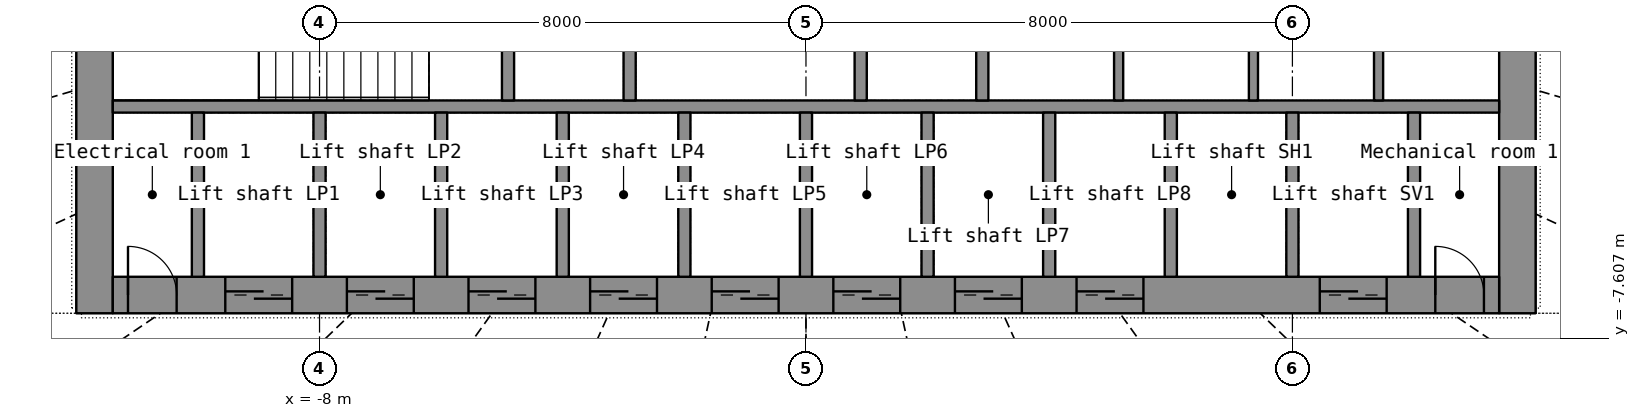
"""IFC4 building model, lengths in metres.
Left out: names, types, materials, properties, quantities, classifications, styles, units other than length and angle.
Written with IfcOpenShell. Run it as: python <this file> out.ifc"""

import sys

from ifc_helpers import new_model, si_unit, direction, frame, frame_2d, origin, place, context, subcontext, project, spatial, rectangle, extrude, element, fill, save


model = new_model("IFC4")
c1 = context("Model", 3, precision=1e-05, world=origin(), true_north=direction((0.0, 1.0)))
c2 = subcontext(c1, "Body", "Model", "MODEL_VIEW")
j1 = project(units=[si_unit("LENGTHUNIT", "METRE"), si_unit("PLANEANGLEUNIT", "RADIAN")], contexts=[c1])
p1 = place(None, origin())
s1 = spatial("IfcSite", under=j1, at=p1, CompositionType="ELEMENT")
p2 = place(p1, origin())
s2 = spatial("IfcBuilding", under=s1, at=p2, CompositionType="ELEMENT")
p3 = place(p2, frame((0.0, 0.0, 51.9)))
s3 = spatial("IfcBuildingStorey", under=s2, at=p3, CompositionType="ELEMENT", Elevation=51.9)
p4 = place(p3, frame((-11.7, -7.2, 0.0), z_axis=(0.0, 0.0, 1.0), x_axis=(0.0, 1.0, 0.0)))
e1 = element("IfcWall", 1, at=p4, inside=s3, PredefinedType="SHEAR", context=c2, shape_type="SweptSolid", body=[
    extrude(rectangle(XDim=14.4, YDim=0.6, at=frame_2d((7.2, 0.0))), origin(), (0.0, 0.0, 1.0), 3.3),
])
p5 = place(p4, frame((6.5, 0.0, 0.0)))
e2 = element("IfcOpeningElement", 2, at=p5, cuts=e1, PredefinedType="OPENING", context=c2, shape_type="SweptSolid", body=[
    extrude(rectangle(XDim=1.4, YDim=2.2, at=frame_2d((0.7, 1.1))), frame((0.0, 0.31, 0.0), z_axis=(0.0, -1.0, 0.0), x_axis=(1.0, 0.0, 0.0)), (0.0, 0.0, 1.0), 0.62),
])
p6 = place(p3, frame((11.7, -7.2, 0.0), z_axis=(0.0, 0.0, 1.0), x_axis=(0.0, 1.0, 0.0)))
e3 = element("IfcWall", 3, at=p6, inside=s3, PredefinedType="SHEAR", context=c2, shape_type="SweptSolid", body=[
    extrude(rectangle(XDim=14.4, YDim=0.6, at=frame_2d((7.2, 0.0))), origin(), (0.0, 0.0, 1.0), 3.3),
])
p7 = place(p6, frame((6.5, 0.0, 0.0)))
e4 = element("IfcOpeningElement", 4, at=p7, cuts=e3, PredefinedType="OPENING", context=c2, shape_type="SweptSolid", body=[
    extrude(rectangle(XDim=1.4, YDim=2.2, at=frame_2d((0.7, 1.1))), frame((0.0, 0.31, 0.0), z_axis=(0.0, -1.0, 0.0), x_axis=(1.0, 0.0, 0.0)), (0.0, 0.0, 1.0), 0.62),
])
p8 = place(p3, frame((-11.4, -6.9, 0.0), z_axis=(0.0, 0.0, 1.0), x_axis=(1.0, 0.0, 0.0)))
e5 = element("IfcWall", 5, at=p8, inside=s3, PredefinedType="SHEAR", context=c2, shape_type="SweptSolid", body=[
    extrude(rectangle(XDim=22.8, YDim=0.6, at=frame_2d((11.4, 0.0))), origin(), (0.0, 0.0, 1.0), 3.3),
])
p9 = place(p8, frame((1.85, 0.0, 0.0)))
e6 = element("IfcOpeningElement", 6, at=p9, cuts=e5, PredefinedType="OPENING", context=c2, shape_type="SweptSolid", body=[
    extrude(rectangle(XDim=1.1, YDim=2.2, at=frame_2d((0.55, 1.1))), frame((0.0, 0.31, 0.0), z_axis=(0.0, -1.0, 0.0), x_axis=(1.0, 0.0, 0.0)), (0.0, 0.0, 1.0), 0.62),
])
p10 = place(p8, frame((3.85, 0.0, 0.0)))
e7 = element("IfcOpeningElement", 7, at=p10, cuts=e5, PredefinedType="OPENING", context=c2, shape_type="SweptSolid", body=[
    extrude(rectangle(XDim=1.1, YDim=2.2, at=frame_2d((0.55, 1.1))), frame((0.0, 0.31, 0.0), z_axis=(0.0, -1.0, 0.0), x_axis=(1.0, 0.0, 0.0)), (0.0, 0.0, 1.0), 0.62),
])
p11 = place(p8, frame((5.85, 0.0, 0.0)))
e8 = element("IfcOpeningElement", 8, at=p11, cuts=e5, PredefinedType="OPENING", context=c2, shape_type="SweptSolid", body=[
    extrude(rectangle(XDim=1.1, YDim=2.2, at=frame_2d((0.55, 1.1))), frame((0.0, 0.31, 0.0), z_axis=(0.0, -1.0, 0.0), x_axis=(1.0, 0.0, 0.0)), (0.0, 0.0, 1.0), 0.62),
])
p12 = place(p8, frame((7.85, 0.0, 0.0)))
e9 = element("IfcOpeningElement", 9, at=p12, cuts=e5, PredefinedType="OPENING", context=c2, shape_type="SweptSolid", body=[
    extrude(rectangle(XDim=1.1, YDim=2.2, at=frame_2d((0.55, 1.1))), frame((0.0, 0.31, 0.0), z_axis=(0.0, -1.0, 0.0), x_axis=(1.0, 0.0, 0.0)), (0.0, 0.0, 1.0), 0.62),
])
p13 = place(p8, frame((9.85, 0.0, 0.0)))
e10 = element("IfcOpeningElement", 10, at=p13, cuts=e5, PredefinedType="OPENING", context=c2, shape_type="SweptSolid", body=[
    extrude(rectangle(XDim=1.1, YDim=2.2, at=frame_2d((0.55, 1.1))), frame((0.0, 0.31, 0.0), z_axis=(0.0, -1.0, 0.0), x_axis=(1.0, 0.0, 0.0)), (0.0, 0.0, 1.0), 0.62),
])
p14 = place(p8, frame((11.85, 0.0, 0.0)))
e11 = element("IfcOpeningElement", 11, at=p14, cuts=e5, PredefinedType="OPENING", context=c2, shape_type="SweptSolid", body=[
    extrude(rectangle(XDim=1.1, YDim=2.2, at=frame_2d((0.55, 1.1))), frame((0.0, 0.31, 0.0), z_axis=(0.0, -1.0, 0.0), x_axis=(1.0, 0.0, 0.0)), (0.0, 0.0, 1.0), 0.62),
])
p15 = place(p8, frame((13.85, 0.0, 0.0)))
e12 = element("IfcOpeningElement", 12, at=p15, cuts=e5, PredefinedType="OPENING", context=c2, shape_type="SweptSolid", body=[
    extrude(rectangle(XDim=1.1, YDim=2.2, at=frame_2d((0.55, 1.1))), frame((0.0, 0.31, 0.0), z_axis=(0.0, -1.0, 0.0), x_axis=(1.0, 0.0, 0.0)), (0.0, 0.0, 1.0), 0.62),
])
p16 = place(p8, frame((15.85, 0.0, 0.0)))
e13 = element("IfcOpeningElement", 13, at=p16, cuts=e5, PredefinedType="OPENING", context=c2, shape_type="SweptSolid", body=[
    extrude(rectangle(XDim=1.1, YDim=2.2, at=frame_2d((0.55, 1.1))), frame((0.0, 0.31, 0.0), z_axis=(0.0, -1.0, 0.0), x_axis=(1.0, 0.0, 0.0)), (0.0, 0.0, 1.0), 0.62),
])
p17 = place(p8, frame((19.85, 0.0, 0.0)))
e14 = element("IfcOpeningElement", 14, at=p17, cuts=e5, PredefinedType="OPENING", context=c2, shape_type="SweptSolid", body=[
    extrude(rectangle(XDim=1.1, YDim=2.2, at=frame_2d((0.55, 1.1))), frame((0.0, 0.31, 0.0), z_axis=(0.0, -1.0, 0.0), x_axis=(1.0, 0.0, 0.0)), (0.0, 0.0, 1.0), 0.62),
])
p18 = place(p8, frame((0.25, 0.0, 0.0)))
e15 = element("IfcOpeningElement", 15, at=p18, cuts=e5, PredefinedType="OPENING", context=c2, shape_type="SweptSolid", body=[
    extrude(rectangle(XDim=0.8, YDim=2.05, at=frame_2d((0.4, 1.025))), frame((0.0, 0.31, 0.0), z_axis=(0.0, -1.0, 0.0), x_axis=(1.0, 0.0, 0.0)), (0.0, 0.0, 1.0), 0.62),
])
p19 = place(p8, frame((21.75, 0.0, 0.0)))
e16 = element("IfcOpeningElement", 16, at=p19, cuts=e5, PredefinedType="OPENING", context=c2, shape_type="SweptSolid", body=[
    extrude(rectangle(XDim=0.8, YDim=2.05, at=frame_2d((0.4, 1.025))), frame((0.0, 0.31, 0.0), z_axis=(0.0, -1.0, 0.0), x_axis=(1.0, 0.0, 0.0)), (0.0, 0.0, 1.0), 0.62),
])
p20 = place(p3, frame((-11.4, -3.8, 0.0), z_axis=(0.0, 0.0, 1.0), x_axis=(1.0, 0.0, 0.0)))
e17 = element("IfcWall", 17, at=p20, inside=s3, PredefinedType="SHEAR", context=c2, shape_type="SweptSolid", body=[
    extrude(rectangle(XDim=22.8, YDim=0.2, at=frame_2d((11.4, 0.0))), origin(), (0.0, 0.0, 1.0), 3.3),
])
for number, where, z_axis, x_axis in (
    (18, (-10.0, -6.6, 0.0), (0.0, 0.0, 1.0), (0.0, 1.0, 0.0)),
    (19, (-8.0, -6.6, 0.0), (0.0, 0.0, 1.0), (0.0, 1.0, 0.0)),
    (20, (-6.0, -6.6, 0.0), (0.0, 0.0, 1.0), (0.0, 1.0, 0.0)),
    (21, (-4.0, -6.6, 0.0), (0.0, 0.0, 1.0), (0.0, 1.0, 0.0)),
    (22, (-2.0, -6.6, 0.0), (0.0, 0.0, 1.0), (0.0, 1.0, 0.0)),
    (23, (0.0, -6.6, 0.0), (0.0, 0.0, 1.0), (0.0, 1.0, 0.0)),
    (24, (2.0, -6.6, 0.0), (0.0, 0.0, 1.0), (0.0, 1.0, 0.0)),
    (25, (4.0, -6.6, 0.0), (0.0, 0.0, 1.0), (0.0, 1.0, 0.0)),
    (26, (6.0, -6.6, 0.0), (0.0, 0.0, 1.0), (0.0, 1.0, 0.0)),
    (27, (8.0, -6.6, 0.0), (0.0, 0.0, 1.0), (0.0, 1.0, 0.0)),
    (28, (10.0, -6.6, 0.0), (0.0, 0.0, 1.0), (0.0, 1.0, 0.0)),
):
    element("IfcWall", number, at=place(p3, frame(where, z_axis=z_axis, x_axis=x_axis)), inside=s3, PredefinedType="SHEAR", context=c2, shape_type="SweptSolid", body=[
        extrude(rectangle(XDim=2.7, YDim=0.2, at=frame_2d((1.35, 0.0))), origin(), (0.0, 0.0, 1.0), 3.3),
    ])
p21 = place(p3, frame((-2.9, -3.7, 0.0), z_axis=(0.0, 0.0, 1.0), x_axis=(0.0, 1.0, 0.0)))
e29 = element("IfcWall", 29, at=p21, inside=s3, PredefinedType="SHEAR", context=c2, shape_type="SweptSolid", body=[
    extrude(rectangle(XDim=7.4, YDim=0.2, at=frame_2d((3.7, 0.0))), origin(), (0.0, 0.0, 1.0), 3.3),
])
p22 = place(p21, frame((3.1, 0.0, 0.0)))
e30 = element("IfcOpeningElement", 30, at=p22, cuts=e29, PredefinedType="OPENING", context=c2, shape_type="SweptSolid", body=[
    extrude(rectangle(XDim=1.2, YDim=2.2, at=frame_2d((0.6, 1.1))), frame((0.0, 0.11, 0.0), z_axis=(0.0, -1.0, 0.0), x_axis=(1.0, 0.0, 0.0)), (0.0, 0.0, 1.0), 0.22),
])
p23 = place(p3, frame((2.9, -3.7, 0.0), z_axis=(0.0, 0.0, 1.0), x_axis=(0.0, 1.0, 0.0)))
e31 = element("IfcWall", 31, at=p23, inside=s3, PredefinedType="SHEAR", context=c2, shape_type="SweptSolid", body=[
    extrude(rectangle(XDim=7.4, YDim=0.2, at=frame_2d((3.7, 0.0))), origin(), (0.0, 0.0, 1.0), 3.3),
])
p24 = place(p23, frame((3.1, 0.0, 0.0)))
e32 = element("IfcOpeningElement", 32, at=p24, cuts=e31, PredefinedType="OPENING", context=c2, shape_type="SweptSolid", body=[
    extrude(rectangle(XDim=1.2, YDim=2.2, at=frame_2d((0.6, 1.1))), frame((0.0, 0.11, 0.0), z_axis=(0.0, -1.0, 0.0), x_axis=(1.0, 0.0, 0.0)), (0.0, 0.0, 1.0), 0.22),
])
for number, where, z_axis, x_axis in (
    (33, (0.9, -3.7, 0.0), (0.0, 0.0, 1.0), (0.0, 1.0, 0.0)),
    (34, (-4.9, -3.7, 0.0), (0.0, 0.0, 1.0), (0.0, 1.0, 0.0)),
):
    element("IfcWall", number, at=place(p3, frame(where, z_axis=z_axis, x_axis=x_axis)), inside=s3, PredefinedType="SHEAR", context=c2, shape_type="SweptSolid", body=[
        extrude(rectangle(XDim=2.35, YDim=0.2, at=frame_2d((1.175, 0.0))), origin(), (0.0, 0.0, 1.0), 3.3),
    ])
for number, where, z_axis, x_axis in (
    (35, (5.142, -3.7, 0.0), (0.0, 0.0, 1.0), (0.0, 1.0, 0.0)),
    (36, (7.359, -3.7, 0.0), (0.0, 0.0, 1.0), (0.0, 1.0, 0.0)),
    (37, (9.417, -3.7, 0.0), (0.0, 0.0, 1.0), (0.0, 1.0, 0.0)),
):
    element("IfcWall", number, at=place(p3, frame(where, z_axis=z_axis, x_axis=x_axis)), inside=s3, PredefinedType="PARTITIONING", context=c2, shape_type="SweptSolid", body=[
        extrude(rectangle(XDim=2.35, YDim=0.15, at=frame_2d((1.175, 0.0))), origin(), (0.0, 0.0, 1.0), 3.3),
    ])
p25 = place(p9, origin())
e38 = element("IfcDoor", 38, at=p25, inside=s3, OperationType="DOUBLE_DOOR_SLIDING", PredefinedType="DOOR", context=c2, shape_type="SweptSolid", body=[
    extrude(rectangle(XDim=1.1, YDim=2.2, at=frame_2d((0.55, 1.1))), frame((0.0, 0.025, 0.0), z_axis=(0.0, -1.0, 0.0), x_axis=(1.0, 0.0, 0.0)), (0.0, 0.0, 1.0), 0.05),
])
fill(e6, e38)
p26 = place(p10, origin())
e39 = element("IfcDoor", 39, at=p26, inside=s3, OperationType="DOUBLE_DOOR_SLIDING", PredefinedType="DOOR", context=c2, shape_type="SweptSolid", body=[
    extrude(rectangle(XDim=1.1, YDim=2.2, at=frame_2d((0.55, 1.1))), frame((0.0, 0.025, 0.0), z_axis=(0.0, -1.0, 0.0), x_axis=(1.0, 0.0, 0.0)), (0.0, 0.0, 1.0), 0.05),
])
fill(e7, e39)
p27 = place(p11, origin())
e40 = element("IfcDoor", 40, at=p27, inside=s3, OperationType="DOUBLE_DOOR_SLIDING", PredefinedType="DOOR", context=c2, shape_type="SweptSolid", body=[
    extrude(rectangle(XDim=1.1, YDim=2.2, at=frame_2d((0.55, 1.1))), frame((0.0, 0.025, 0.0), z_axis=(0.0, -1.0, 0.0), x_axis=(1.0, 0.0, 0.0)), (0.0, 0.0, 1.0), 0.05),
])
fill(e8, e40)
p28 = place(p12, origin())
e41 = element("IfcDoor", 41, at=p28, inside=s3, OperationType="DOUBLE_DOOR_SLIDING", PredefinedType="DOOR", context=c2, shape_type="SweptSolid", body=[
    extrude(rectangle(XDim=1.1, YDim=2.2, at=frame_2d((0.55, 1.1))), frame((0.0, 0.025, 0.0), z_axis=(0.0, -1.0, 0.0), x_axis=(1.0, 0.0, 0.0)), (0.0, 0.0, 1.0), 0.05),
])
fill(e9, e41)
p29 = place(p13, origin())
e42 = element("IfcDoor", 42, at=p29, inside=s3, OperationType="DOUBLE_DOOR_SLIDING", PredefinedType="DOOR", context=c2, shape_type="SweptSolid", body=[
    extrude(rectangle(XDim=1.1, YDim=2.2, at=frame_2d((0.55, 1.1))), frame((0.0, 0.025, 0.0), z_axis=(0.0, -1.0, 0.0), x_axis=(1.0, 0.0, 0.0)), (0.0, 0.0, 1.0), 0.05),
])
fill(e10, e42)
p30 = place(p14, origin())
e43 = element("IfcDoor", 43, at=p30, inside=s3, OperationType="DOUBLE_DOOR_SLIDING", PredefinedType="DOOR", context=c2, shape_type="SweptSolid", body=[
    extrude(rectangle(XDim=1.1, YDim=2.2, at=frame_2d((0.55, 1.1))), frame((0.0, 0.025, 0.0), z_axis=(0.0, -1.0, 0.0), x_axis=(1.0, 0.0, 0.0)), (0.0, 0.0, 1.0), 0.05),
])
fill(e11, e43)
p31 = place(p15, origin())
e44 = element("IfcDoor", 44, at=p31, inside=s3, OperationType="DOUBLE_DOOR_SLIDING", PredefinedType="DOOR", context=c2, shape_type="SweptSolid", body=[
    extrude(rectangle(XDim=1.1, YDim=2.2, at=frame_2d((0.55, 1.1))), frame((0.0, 0.025, 0.0), z_axis=(0.0, -1.0, 0.0), x_axis=(1.0, 0.0, 0.0)), (0.0, 0.0, 1.0), 0.05),
])
fill(e12, e44)
p32 = place(p16, origin())
e45 = element("IfcDoor", 45, at=p32, inside=s3, OperationType="DOUBLE_DOOR_SLIDING", PredefinedType="DOOR", context=c2, shape_type="SweptSolid", body=[
    extrude(rectangle(XDim=1.1, YDim=2.2, at=frame_2d((0.55, 1.1))), frame((0.0, 0.025, 0.0), z_axis=(0.0, -1.0, 0.0), x_axis=(1.0, 0.0, 0.0)), (0.0, 0.0, 1.0), 0.05),
])
fill(e13, e45)
p33 = place(p17, origin())
e46 = element("IfcDoor", 46, at=p33, inside=s3, OperationType="DOUBLE_DOOR_SLIDING", PredefinedType="DOOR", context=c2, shape_type="SweptSolid", body=[
    extrude(rectangle(XDim=1.1, YDim=2.2, at=frame_2d((0.55, 1.1))), frame((0.0, 0.025, 0.0), z_axis=(0.0, -1.0, 0.0), x_axis=(1.0, 0.0, 0.0)), (0.0, 0.0, 1.0), 0.05),
])
fill(e14, e46)
p34 = place(p18, origin())
e47 = element("IfcDoor", 47, at=p34, inside=s3, OperationType="SINGLE_SWING_LEFT", PredefinedType="DOOR", context=c2, shape_type="SweptSolid", body=[
    extrude(rectangle(XDim=0.8, YDim=2.05, at=frame_2d((0.4, 1.025))), frame((0.0, 0.025, 0.0), z_axis=(0.0, -1.0, 0.0), x_axis=(1.0, 0.0, 0.0)), (0.0, 0.0, 1.0), 0.05),
])
fill(e15, e47)
p35 = place(p19, origin())
e48 = element("IfcDoor", 48, at=p35, inside=s3, OperationType="SINGLE_SWING_LEFT", PredefinedType="DOOR", context=c2, shape_type="SweptSolid", body=[
    extrude(rectangle(XDim=0.8, YDim=2.05, at=frame_2d((0.4, 1.025))), frame((0.0, 0.025, 0.0), z_axis=(0.0, -1.0, 0.0), x_axis=(1.0, 0.0, 0.0)), (0.0, 0.0, 1.0), 0.05),
])
fill(e16, e48)
save(model, sys.argv[1])
